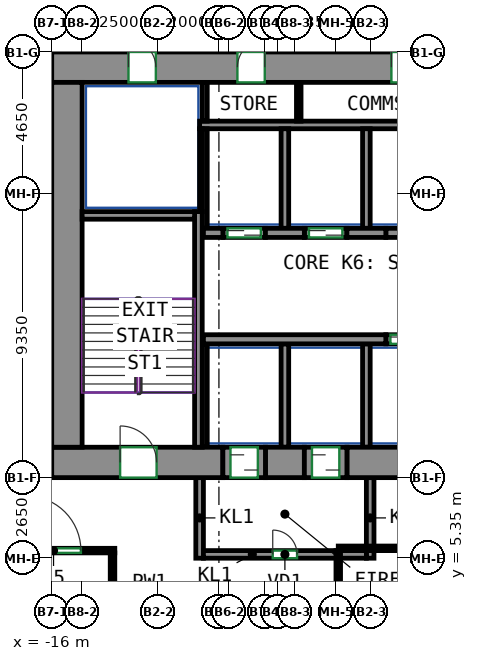
"""IFC4 building model, lengths in metres.
Left out: names, types, materials, properties, quantities, classifications, styles, units other than length and angle.
Written with IfcOpenShell. Run it as: python <this file> out.ifc"""

import sys

from ifc_helpers import new_model, si_unit, direction, frame, frame_2d, origin, place, context, subcontext, project, spatial, rectangle, extrude, source, transform, mapped, element, fill, save


model = new_model("IFC4")
c1 = context("Model", 3, precision=1e-05, world=origin(), true_north=direction((0.0, 1.0)))
c2 = subcontext(c1, "Body", "Model", "MODEL_VIEW")
j1 = project(units=[si_unit("LENGTHUNIT", "METRE"), si_unit("PLANEANGLEUNIT", "RADIAN")], contexts=[c1])
p1 = place(None, origin())
s1 = spatial("IfcSite", under=j1, at=p1, CompositionType="ELEMENT")
p2 = place(p1, origin())
s2 = spatial("IfcBuilding", under=s1, at=p2, CompositionType="ELEMENT")
p3 = place(p2, frame((0.0, 0.0, 27.0)))
s3 = spatial("IfcBuildingStorey", under=s2, at=p3, CompositionType="ELEMENT", Elevation=27.0)
m1 = source(origin(), c2, "Body", "SweptSolid", [
    extrude(rectangle(XDim=5.63, YDim=1.0, at=frame_2d((2.815, 0.0))), origin(), (0.0, 0.0, 1.0), 3.72),
])
p4 = place(p3, frame((-16.0, 8.5, 0.0), z_axis=(0.0, 0.0, 1.0), x_axis=(1.0, 0.0, 0.0)))
e1 = element("IfcWall", 1, at=p4, inside=s3, PredefinedType="SHEAR", context=c2, shape_type="MappedRepresentation", body=[
    mapped(m1, transform((0.0, 0.0, 0.0))),
])
p5 = place(p4, frame((2.25, 0.0, 0.0)))
e2 = element("IfcOpeningElement", 2, at=p5, cuts=e1, PredefinedType="OPENING", context=c2, shape_type="SweptSolid", body=[
    extrude(rectangle(XDim=1.2, YDim=2.1, at=frame_2d((0.6, 1.05))), frame((0.0, 0.51, 0.0), z_axis=(0.0, -1.0, 0.0), x_axis=(1.0, 0.0, 0.0)), (0.0, 0.0, 1.0), 1.02),
])
m2 = source(origin(), c2, "Body", "SweptSolid", [
    extrude(rectangle(XDim=1.28, YDim=1.0, at=frame_2d((0.64, 0.0))), origin(), (0.0, 0.0, 1.0), 3.72),
])
p6 = place(p3, frame((-8.97, 8.5, 0.0), z_axis=(0.0, 0.0, 1.0), x_axis=(1.0, 0.0, 0.0)))
e3 = element("IfcWall", 3, at=p6, inside=s3, PredefinedType="SHEAR", context=c2, shape_type="MappedRepresentation", body=[
    mapped(m2, transform((0.0, 0.0, 0.0))),
])
m3 = source(origin(), c2, "Body", "SweptSolid", [
    extrude(rectangle(XDim=14.18, YDim=1.0, at=frame_2d((7.09, 0.0))), origin(), (0.0, 0.0, 1.0), 3.72),
])
p7 = place(p3, frame((-6.29, 8.5, 0.0), z_axis=(0.0, 0.0, 1.0), x_axis=(1.0, 0.0, 0.0)))
e4 = element("IfcWall", 4, at=p7, inside=s3, PredefinedType="SHEAR", context=c2, shape_type="MappedRepresentation", body=[
    mapped(m3, transform((0.0, 0.0, 0.0))),
])
m4 = source(origin(), c2, "Body", "SweptSolid", [
    extrude(rectangle(XDim=34.1, YDim=1.0, at=frame_2d((17.05, 0.0))), origin(), (0.0, 0.0, 1.0), 3.72),
])
p8 = place(p3, frame((-16.0, 21.5, 0.0), z_axis=(0.0, 0.0, 1.0), x_axis=(1.0, 0.0, 0.0)))
e5 = element("IfcWall", 5, at=p8, inside=s3, PredefinedType="SHEAR", context=c2, shape_type="MappedRepresentation", body=[
    mapped(m4, transform((0.0, 0.0, 0.0))),
])
p9 = place(p8, frame((6.108, 0.0, 0.0)))
e6 = element("IfcOpeningElement", 6, at=p9, cuts=e5, PredefinedType="OPENING", context=c2, shape_type="SweptSolid", body=[
    extrude(rectangle(XDim=0.9, YDim=2.1, at=frame_2d((0.45, 1.05))), frame((0.0, 0.51, 0.0), z_axis=(0.0, -1.0, 0.0), x_axis=(1.0, 0.0, 0.0)), (0.0, 0.0, 1.0), 1.02),
])
p10 = place(p8, frame((11.173, 0.0, 0.0)))
e7 = element("IfcOpeningElement", 7, at=p10, cuts=e5, PredefinedType="OPENING", context=c2, shape_type="SweptSolid", body=[
    extrude(rectangle(XDim=0.9, YDim=2.1, at=frame_2d((0.45, 1.05))), frame((0.0, 0.51, 0.0), z_axis=(0.0, -1.0, 0.0), x_axis=(1.0, 0.0, 0.0)), (0.0, 0.0, 1.0), 1.02),
])
p11 = place(p8, frame((16.238, 0.0, 0.0)))
e8 = element("IfcOpeningElement", 8, at=p11, cuts=e5, PredefinedType="OPENING", context=c2, shape_type="SweptSolid", body=[
    extrude(rectangle(XDim=0.9, YDim=2.1, at=frame_2d((0.45, 1.05))), frame((0.0, 0.51, 0.0), z_axis=(0.0, -1.0, 0.0), x_axis=(1.0, 0.0, 0.0)), (0.0, 0.0, 1.0), 1.02),
])
p12 = place(p8, frame((21.062, 0.0, 0.0)))
e9 = element("IfcOpeningElement", 9, at=p12, cuts=e5, PredefinedType="OPENING", context=c2, shape_type="SweptSolid", body=[
    extrude(rectangle(XDim=0.9, YDim=2.1, at=frame_2d((0.45, 1.05))), frame((0.0, 0.51, 0.0), z_axis=(0.0, -1.0, 0.0), x_axis=(1.0, 0.0, 0.0)), (0.0, 0.0, 1.0), 1.02),
])
p13 = place(p8, frame((26.489, 0.0, 0.0)))
e10 = element("IfcOpeningElement", 10, at=p13, cuts=e5, PredefinedType="OPENING", context=c2, shape_type="SweptSolid", body=[
    extrude(rectangle(XDim=0.9, YDim=2.1, at=frame_2d((0.45, 1.05))), frame((0.0, 0.51, 0.0), z_axis=(0.0, -1.0, 0.0), x_axis=(1.0, 0.0, 0.0)), (0.0, 0.0, 1.0), 1.02),
])
p14 = place(p8, frame((2.525, 0.0, 0.0)))
e11 = element("IfcOpeningElement", 11, at=p14, cuts=e5, PredefinedType="OPENING", context=c2, shape_type="SweptSolid", body=[
    extrude(rectangle(XDim=0.9, YDim=2.1, at=frame_2d((0.45, 1.05))), frame((0.0, 0.51, 0.0), z_axis=(0.0, -1.0, 0.0), x_axis=(1.0, 0.0, 0.0)), (0.0, 0.0, 1.0), 1.02),
])
p15 = place(p8, frame((30.675, 0.0, 0.0)))
e12 = element("IfcOpeningElement", 12, at=p15, cuts=e5, PredefinedType="OPENING", context=c2, shape_type="SweptSolid", body=[
    extrude(rectangle(XDim=0.9, YDim=2.1, at=frame_2d((0.45, 1.05))), frame((0.0, 0.51, 0.0), z_axis=(0.0, -1.0, 0.0), x_axis=(1.0, 0.0, 0.0)), (0.0, 0.0, 1.0), 1.02),
])
m5 = source(origin(), c2, "Body", "SweptSolid", [
    extrude(rectangle(XDim=12.0, YDim=1.0, at=frame_2d((6.0, 0.0))), origin(), (0.0, 0.0, 1.0), 3.72),
])
p16 = place(p3, frame((-15.5, 9.0, 0.0), z_axis=(0.0, 0.0, 1.0), x_axis=(0.0, 1.0, 0.0)))
e13 = element("IfcWall", 13, at=p16, inside=s3, PredefinedType="SHEAR", context=c2, shape_type="MappedRepresentation", body=[
    mapped(m5, transform((0.0, 0.0, 0.0))),
])
m6 = source(origin(), c2, "Body", "SweptSolid", [
    extrude(rectangle(XDim=7.75, YDim=0.25, at=frame_2d((3.875, 0.0))), origin(), (0.0, 0.0, 1.0), 3.72),
])
p17 = place(p3, frame((-11.175, 9.0, 0.0), z_axis=(0.0, 0.0, 1.0), x_axis=(0.0, 1.0, 0.0)))
e14 = element("IfcWall", 14, at=p17, inside=s3, PredefinedType="SHEAR", context=c2, shape_type="MappedRepresentation", body=[
    mapped(m6, transform((0.0, 0.0, 0.0))),
])
m7 = source(origin(), c2, "Body", "SweptSolid", [
    extrude(rectangle(XDim=3.7, YDim=0.25, at=frame_2d((1.85, 0.0))), origin(), (0.0, 0.0, 1.0), 3.72),
])
p18 = place(p3, frame((-15.0, 16.625, 0.0), z_axis=(0.0, 0.0, 1.0), x_axis=(1.0, 0.0, 0.0)))
e15 = element("IfcWall", 15, at=p18, inside=s3, PredefinedType="SHEAR", context=c2, shape_type="MappedRepresentation", body=[
    mapped(m7, transform((0.0, 0.0, 0.0))),
])
m8 = source(origin(), c2, "Body", "SweptSolid", [
    extrude(rectangle(XDim=6.0, YDim=0.3, at=frame_2d((3.0, 0.0))), origin(), (0.0, 0.0, 1.0), 3.72),
])
p19 = place(p3, frame((-11.01, 12.55, 0.0), z_axis=(0.0, 0.0, 1.0), x_axis=(1.0, 0.0, 0.0)))
e16 = element("IfcWall", 16, at=p19, inside=s3, PredefinedType="SHEAR", context=c2, shape_type="MappedRepresentation", body=[
    mapped(m8, transform((0.0, 0.0, 0.0))),
])
m9 = source(origin(), c2, "Body", "SweptSolid", [
    extrude(rectangle(XDim=0.64, YDim=0.3, at=frame_2d((0.32, 0.0))), origin(), (0.0, 0.0, 1.0), 3.72),
])
p20 = place(p3, frame((-11.01, 16.05, 0.0), z_axis=(0.0, 0.0, 1.0), x_axis=(1.0, 0.0, 0.0)))
e17 = element("IfcWall", 17, at=p20, inside=s3, PredefinedType="SHEAR", context=c2, shape_type="MappedRepresentation", body=[
    mapped(m9, transform((0.0, 0.0, 0.0))),
])
m10 = source(origin(), c2, "Body", "SweptSolid", [
    extrude(rectangle(XDim=1.28, YDim=0.3, at=frame_2d((0.64, 0.0))), origin(), (0.0, 0.0, 1.0), 3.72),
])
for number, where, z_axis, x_axis in (
    (18, (-8.97, 16.05, 0.0), (0.0, 0.0, 1.0), (1.0, 0.0, 0.0)),
    (19, (-6.29, 16.05, 0.0), (0.0, 0.0, 1.0), (1.0, 0.0, 0.0)),
):
    element("IfcWall", number, at=place(p3, frame(where, z_axis=z_axis, x_axis=x_axis)), inside=s3, PredefinedType="SHEAR", context=c2, shape_type="MappedRepresentation", body=[
        mapped(m10, transform((0.0, 0.0, 0.0))),
    ])
m11 = source(origin(), c2, "Body", "SweptSolid", [
    extrude(rectangle(XDim=1.4, YDim=0.3, at=frame_2d((0.7, 0.0))), origin(), (0.0, 0.0, 1.0), 3.72),
])
p21 = place(p3, frame((-5.01, 12.55, 0.0), z_axis=(0.0, 0.0, 1.0), x_axis=(1.0, 0.0, 0.0)))
e20 = element("IfcWall", 20, at=p21, inside=s3, PredefinedType="PARTITIONING", context=c2, shape_type="MappedRepresentation", body=[
    mapped(m11, transform((0.0, 0.0, 0.0))),
])
p22 = place(p21, frame((0.15, 0.0, 0.0)))
e21 = element("IfcOpeningElement", 21, at=p22, cuts=e20, PredefinedType="OPENING", context=c2, shape_type="SweptSolid", body=[
    extrude(rectangle(XDim=1.1, YDim=2.1, at=frame_2d((0.55, 1.05))), frame((0.0, 0.16, 0.0), z_axis=(0.0, -1.0, 0.0), x_axis=(1.0, 0.0, 0.0)), (0.0, 0.0, 1.0), 0.32),
])
m12 = source(origin(), c2, "Body", "SweptSolid", [
    extrude(rectangle(XDim=1.4, YDim=0.3, at=frame_2d((0.7, 0.0))), origin(), (0.0, 0.0, 1.0), 3.72),
])
p23 = place(p3, frame((-10.37, 16.05, 0.0), z_axis=(0.0, 0.0, 1.0), x_axis=(1.0, 0.0, 0.0)))
e22 = element("IfcWall", 22, at=p23, inside=s3, PredefinedType="PARTITIONING", context=c2, shape_type="MappedRepresentation", body=[
    mapped(m12, transform((0.0, 0.0, 0.0))),
])
p24 = place(p23, frame((0.15, 0.0, 0.0)))
e23 = element("IfcOpeningElement", 23, at=p24, cuts=e22, PredefinedType="OPENING", context=c2, shape_type="SweptSolid", body=[
    extrude(rectangle(XDim=1.1, YDim=2.1, at=frame_2d((0.55, 1.05))), frame((0.0, 0.16, 0.0), z_axis=(0.0, -1.0, 0.0), x_axis=(1.0, 0.0, 0.0)), (0.0, 0.0, 1.0), 0.32),
])
p25 = place(p3, frame((-7.69, 16.05, 0.0), z_axis=(0.0, 0.0, 1.0), x_axis=(1.0, 0.0, 0.0)))
e24 = element("IfcWall", 24, at=p25, inside=s3, PredefinedType="PARTITIONING", context=c2, shape_type="MappedRepresentation", body=[
    mapped(m11, transform((0.0, 0.0, 0.0))),
])
p26 = place(p25, frame((0.15, 0.0, 0.0)))
e25 = element("IfcOpeningElement", 25, at=p26, cuts=e24, PredefinedType="OPENING", context=c2, shape_type="SweptSolid", body=[
    extrude(rectangle(XDim=1.1, YDim=2.1, at=frame_2d((0.55, 1.05))), frame((0.0, 0.16, 0.0), z_axis=(0.0, -1.0, 0.0), x_axis=(1.0, 0.0, 0.0)), (0.0, 0.0, 1.0), 0.32),
])
p27 = place(p3, frame((-5.01, 16.05, 0.0), z_axis=(0.0, 0.0, 1.0), x_axis=(1.0, 0.0, 0.0)))
e26 = element("IfcWall", 26, at=p27, inside=s3, PredefinedType="PARTITIONING", context=c2, shape_type="MappedRepresentation", body=[
    mapped(m11, transform((0.0, 0.0, 0.0))),
])
m13 = source(origin(), c2, "Body", "SweptSolid", [
    extrude(rectangle(XDim=2.65, YDim=0.25, at=frame_2d((1.325, 0.0))), origin(), (0.0, 0.0, 1.0), 3.72),
])
for number, where, z_axis, x_axis in (
    (27, (-11.135, 5.35, 0.0), (0.0, 0.0, 1.0), (0.0, 1.0, 0.0)),
    (28, (-5.525, 5.35, 0.0), (0.0, 0.0, 1.0), (0.0, 1.0, 0.0)),
):
    element("IfcWall", number, at=place(p3, frame(where, z_axis=z_axis, x_axis=x_axis)), inside=s3, PredefinedType="PARTITIONING", context=c2, shape_type="MappedRepresentation", body=[
        mapped(m13, transform((0.0, 0.0, 0.0))),
    ])
m14 = source(origin(), c2, "Body", "SweptSolid", [
    extrude(rectangle(XDim=5.36, YDim=0.25, at=frame_2d((2.68, 0.0))), origin(), (0.0, 0.0, 1.0), 3.72),
])
p28 = place(p3, frame((-11.01, 5.475, 0.0), z_axis=(0.0, 0.0, 1.0), x_axis=(1.0, 0.0, 0.0)))
e29 = element("IfcWall", 29, at=p28, inside=s3, PredefinedType="PARTITIONING", context=c2, shape_type="MappedRepresentation", body=[
    mapped(m14, transform((0.0, 0.0, 0.0))),
])
p29 = place(p28, frame((2.28, 0.0, 0.0)))
e30 = element("IfcOpeningElement", 30, at=p29, cuts=e29, PredefinedType="OPENING", context=c2, shape_type="SweptSolid", body=[
    extrude(rectangle(XDim=0.8, YDim=2.0, at=frame_2d((0.4, 1.0))), frame((0.0, 0.135, 0.0), z_axis=(0.0, -1.0, 0.0), x_axis=(1.0, 0.0, 0.0)), (0.0, 0.0, 1.0), 0.27),
])
m15 = source(origin(), c2, "Body", "SweptSolid", [
    extrude(rectangle(XDim=24.37, YDim=0.25, at=frame_2d((12.185, 0.0))), origin(), (0.0, 0.0, 1.0), 3.72),
])
p30 = place(p3, frame((-11.135, 19.6, 0.0), z_axis=(0.0, 0.0, 1.0), x_axis=(1.0, 0.0, 0.0)))
e31 = element("IfcWall", 31, at=p30, inside=s3, PredefinedType="PARTITIONING", context=c2, shape_type="MappedRepresentation", body=[
    mapped(m15, transform((0.0, 0.0, 0.0))),
])
m16 = source(origin(), c2, "Body", "SweptSolid", [
    extrude(rectangle(XDim=3.275, YDim=0.165, at=frame_2d((1.638, 0.0))), origin(), (0.0, 0.0, 1.0), 3.72),
])
p31 = place(p3, frame((-10.968, 16.2, 0.0), z_axis=(0.0, 0.0, 1.0), x_axis=(0.0, 1.0, 0.0)))
e32 = element("IfcWall", 32, at=p31, inside=s3, PredefinedType="PARTITIONING", context=c2, shape_type="MappedRepresentation", body=[
    mapped(m16, transform((0.0, 0.0, 0.0))),
])
m17 = source(origin(), c2, "Body", "SweptSolid", [
    extrude(rectangle(XDim=1.275, YDim=0.165, at=frame_2d((0.637, 0.0))), origin(), (0.0, 0.0, 1.0), 3.72),
])
p32 = place(p3, frame((-10.968, 19.725, 0.0), z_axis=(0.0, 0.0, 1.0), x_axis=(0.0, 1.0, 0.0)))
e33 = element("IfcWall", 33, at=p32, inside=s3, PredefinedType="PARTITIONING", context=c2, shape_type="MappedRepresentation", body=[
    mapped(m17, transform((0.0, 0.0, 0.0))),
])
m18 = source(origin(), c2, "Body", "SweptSolid", [
    extrude(rectangle(XDim=2.725, YDim=0.085, at=frame_2d((1.363, 0.0))), origin(), (0.0, 0.0, 1.0), 3.72),
])
p33 = place(p3, frame((-11.093, 16.75, 0.0), z_axis=(0.0, 0.0, 1.0), x_axis=(0.0, 1.0, 0.0)))
e34 = element("IfcWall", 34, at=p33, inside=s3, PredefinedType="PARTITIONING", context=c2, shape_type="MappedRepresentation", body=[
    mapped(m18, transform((0.0, 0.0, 0.0))),
])
m19 = source(origin(), c2, "Body", "SweptSolid", [
    extrude(rectangle(XDim=3.275, YDim=0.25, at=frame_2d((1.638, 0.0))), origin(), (0.0, 0.0, 1.0), 3.72),
])
for number, where, z_axis, x_axis in (
    (35, (-5.65, 16.2, 0.0), (0.0, 0.0, 1.0), (0.0, 1.0, 0.0)),
    (36, (-8.33, 16.2, 0.0), (0.0, 0.0, 1.0), (0.0, 1.0, 0.0)),
):
    element("IfcWall", number, at=place(p3, frame(where, z_axis=z_axis, x_axis=x_axis)), inside=s3, PredefinedType="PARTITIONING", context=c2, shape_type="MappedRepresentation", body=[
        mapped(m19, transform((0.0, 0.0, 0.0))),
    ])
m20 = source(origin(), c2, "Body", "SweptSolid", [
    extrude(rectangle(XDim=3.4, YDim=0.165, at=frame_2d((1.7, 0.0))), origin(), (0.0, 0.0, 1.0), 3.72),
])
p34 = place(p3, frame((-10.968, 9.0, 0.0), z_axis=(0.0, 0.0, 1.0), x_axis=(0.0, 1.0, 0.0)))
e37 = element("IfcWall", 37, at=p34, inside=s3, PredefinedType="PARTITIONING", context=c2, shape_type="MappedRepresentation", body=[
    mapped(m20, transform((0.0, 0.0, 0.0))),
])
m21 = source(origin(), c2, "Body", "SweptSolid", [
    extrude(rectangle(XDim=3.4, YDim=0.25, at=frame_2d((1.7, 0.0))), origin(), (0.0, 0.0, 1.0), 3.72),
])
for number, where, z_axis, x_axis in (
    (38, (-5.65, 9.0, 0.0), (0.0, 0.0, 1.0), (0.0, 1.0, 0.0)),
    (39, (-8.33, 9.0, 0.0), (0.0, 0.0, 1.0), (0.0, 1.0, 0.0)),
):
    element("IfcWall", number, at=place(p3, frame(where, z_axis=z_axis, x_axis=x_axis)), inside=s3, PredefinedType="PARTITIONING", context=c2, shape_type="MappedRepresentation", body=[
        mapped(m21, transform((0.0, 0.0, 0.0))),
    ])
m22 = source(origin(), c2, "Body", "SweptSolid", [
    extrude(rectangle(XDim=1.275, YDim=0.15, at=frame_2d((0.637, 0.0))), origin(), (0.0, 0.0, 1.0), 3.72),
])
p35 = place(p3, frame((-7.875, 19.725, 0.0), z_axis=(0.0, 0.0, 1.0), x_axis=(0.0, 1.0, 0.0)))
e40 = element("IfcWall", 40, at=p35, inside=s3, PredefinedType="PARTITIONING", context=c2, shape_type="MappedRepresentation", body=[
    mapped(m22, transform((0.0, 0.0, 0.0))),
])
m23 = source(origin(), c2, "Body", "SweptSolid", [
    extrude(rectangle(XDim=1.4, YDim=1.0, at=frame_2d((0.7, 0.0))), origin(), (0.0, 0.0, 1.0), 2.7),
])
p36 = place(p3, frame((-10.37, 8.5, 0.0), z_axis=(0.0, 0.0, 1.0), x_axis=(1.0, 0.0, 0.0)))
e41 = element("IfcWall", 41, at=p36, inside=s3, PredefinedType="PARTITIONING", context=c2, shape_type="MappedRepresentation", body=[
    mapped(m23, transform((0.0, 0.0, 0.0))),
])
p37 = place(p36, frame((0.25, 0.0, 0.0)))
e42 = element("IfcOpeningElement", 42, at=p37, cuts=e41, PredefinedType="OPENING", context=c2, shape_type="SweptSolid", body=[
    extrude(rectangle(XDim=0.9, YDim=2.1, at=frame_2d((0.45, 1.05))), frame((0.0, 0.51, 0.0), z_axis=(0.0, -1.0, 0.0), x_axis=(1.0, 0.0, 0.0)), (0.0, 0.0, 1.0), 1.02),
])
m24 = source(origin(), c2, "Body", "SweptSolid", [
    extrude(rectangle(XDim=1.4, YDim=1.0, at=frame_2d((0.7, 0.0))), origin(), (0.0, 0.0, 1.0), 2.7),
])
p38 = place(p3, frame((-7.69, 8.5, 0.0), z_axis=(0.0, 0.0, 1.0), x_axis=(1.0, 0.0, 0.0)))
e43 = element("IfcWall", 43, at=p38, inside=s3, PredefinedType="PARTITIONING", context=c2, shape_type="MappedRepresentation", body=[
    mapped(m24, transform((0.0, 0.0, 0.0))),
])
p39 = place(p38, frame((0.25, 0.0, 0.0)))
e44 = element("IfcOpeningElement", 44, at=p39, cuts=e43, PredefinedType="OPENING", context=c2, shape_type="SweptSolid", body=[
    extrude(rectangle(XDim=0.9, YDim=2.1, at=frame_2d((0.45, 1.05))), frame((0.0, 0.51, 0.0), z_axis=(0.0, -1.0, 0.0), x_axis=(1.0, 0.0, 0.0)), (0.0, 0.0, 1.0), 1.02),
])
p40 = place(p3, frame((-14.0, 5.525, 0.0), z_axis=(0.0, 0.0, 1.0), x_axis=(0.0, -1.0, 0.0)))
e45 = element("IfcWall", 45, at=p40, inside=s3, PredefinedType="PARTITIONING", context=c2, shape_type="SweptSolid", body=[
    extrude(rectangle(XDim=1.95, YDim=0.15, at=frame_2d((0.975, 0.0))), origin(), (0.0, 0.0, 1.0), 3.72),
])
p41 = place(p3, frame((-19.275, 5.6, 0.0), z_axis=(0.0, 0.0, 1.0), x_axis=(1.0, 0.0, 0.0)))
e46 = element("IfcWall", 46, at=p41, inside=s3, PredefinedType="PARTITIONING", context=c2, shape_type="SweptSolid", body=[
    extrude(rectangle(XDim=5.35, YDim=0.15, at=frame_2d((2.675, 0.0))), origin(), (0.0, 0.0, 1.0), 3.72),
])
p42 = place(p41, frame((2.435, 0.0, 0.0)))
e47 = element("IfcOpeningElement", 47, at=p42, cuts=e46, PredefinedType="OPENING", context=c2, shape_type="SweptSolid", body=[
    extrude(rectangle(XDim=1.8, YDim=2.1, at=frame_2d((0.9, 1.05))), frame((0.0, 0.085, 0.0), z_axis=(0.0, -1.0, 0.0), x_axis=(1.0, 0.0, 0.0)), (0.0, 0.0, 1.0), 0.17),
])
p43 = place(p3, frame((-6.575, -9.4, 0.0), z_axis=(0.0, 0.0, 1.0), x_axis=(0.0, 1.0, 0.0)))
e48 = element("IfcWall", 48, at=p43, inside=s3, PredefinedType="PARTITIONING", context=c2, shape_type="SweptSolid", body=[
    extrude(rectangle(XDim=15.0, YDim=0.15, at=frame_2d((7.5, 0.0))), origin(), (0.0, 0.0, 1.0), 3.72),
])
p44 = place(p3, frame((-6.575, 5.675, 0.0), z_axis=(0.0, 0.0, 1.0), x_axis=(1.0, 0.0, 0.0)))
e49 = element("IfcWall", 49, at=p44, inside=s3, PredefinedType="PARTITIONING", context=c2, shape_type="SweptSolid", body=[
    extrude(rectangle(XDim=15.075, YDim=0.15, at=frame_2d((7.538, 0.0))), origin(), (0.0, 0.0, 1.0), 3.72),
])
p45 = place(p29, origin())
e50 = element("IfcDoor", 50, at=p45, inside=s3, OperationType="SINGLE_SWING_LEFT", PredefinedType="DOOR", context=c2, shape_type="SweptSolid", body=[
    extrude(rectangle(XDim=0.8, YDim=2.0, at=frame_2d((0.4, 1.0))), frame((0.0, 0.025, 0.0), z_axis=(0.0, -1.0, 0.0), x_axis=(1.0, 0.0, 0.0)), (0.0, 0.0, 1.0), 0.05),
])
fill(e30, e50)
p46 = place(p37, origin())
e51 = element("IfcDoor", 51, at=p46, inside=s3, OperationType="SLIDING_TO_LEFT", PredefinedType="DOOR", context=c2, shape_type="SweptSolid", body=[
    extrude(rectangle(XDim=0.9, YDim=2.1, at=frame_2d((0.45, 1.05))), frame((0.0, 0.405, 0.0), z_axis=(0.0, -1.0, 0.0), x_axis=(1.0, 0.0, 0.0)), (0.0, 0.0, 1.0), 0.05),
])
fill(e42, e51)
p47 = place(p39, origin())
e52 = element("IfcDoor", 52, at=p47, inside=s3, OperationType="SLIDING_TO_RIGHT", PredefinedType="DOOR", context=c2, shape_type="SweptSolid", body=[
    extrude(rectangle(XDim=0.9, YDim=2.1, at=frame_2d((0.45, 1.05))), frame((0.0, 0.405, 0.0), z_axis=(0.0, -1.0, 0.0), x_axis=(1.0, 0.0, 0.0)), (0.0, 0.0, 1.0), 0.05),
])
fill(e44, e52)
p48 = place(p22, origin())
e53 = element("IfcDoor", 53, at=p48, inside=s3, OperationType="DOUBLE_DOOR_SLIDING", PredefinedType="DOOR", context=c2, shape_type="SweptSolid", body=[
    extrude(rectangle(XDim=1.1, YDim=2.1, at=frame_2d((0.55, 1.05))), frame((0.0, 0.025, 0.0), z_axis=(0.0, -1.0, 0.0), x_axis=(1.0, 0.0, 0.0)), (0.0, 0.0, 1.0), 0.05),
])
fill(e21, e53)
p49 = place(p24, origin())
e54 = element("IfcDoor", 54, at=p49, inside=s3, OperationType="DOUBLE_DOOR_SLIDING", PredefinedType="DOOR", context=c2, shape_type="SweptSolid", body=[
    extrude(rectangle(XDim=1.1, YDim=2.1, at=frame_2d((0.55, 1.05))), frame((0.0, 0.025, 0.0), z_axis=(0.0, -1.0, 0.0), x_axis=(1.0, 0.0, 0.0)), (0.0, 0.0, 1.0), 0.05),
])
fill(e23, e54)
p50 = place(p26, origin())
e55 = element("IfcDoor", 55, at=p50, inside=s3, OperationType="DOUBLE_DOOR_SLIDING", PredefinedType="DOOR", context=c2, shape_type="SweptSolid", body=[
    extrude(rectangle(XDim=1.1, YDim=2.1, at=frame_2d((0.55, 1.05))), frame((0.0, 0.025, 0.0), z_axis=(0.0, -1.0, 0.0), x_axis=(1.0, 0.0, 0.0)), (0.0, 0.0, 1.0), 0.05),
])
fill(e25, e55)
p51 = place(p9, origin())
e56 = element("IfcDoor", 56, at=p51, inside=s3, OperationType="SINGLE_SWING_RIGHT", PredefinedType="DOOR", context=c2, shape_type="SweptSolid", body=[
    extrude(rectangle(XDim=0.9, YDim=2.1, at=frame_2d((0.45, 1.05))), frame((0.0, -0.355, 0.0), z_axis=(0.0, -1.0, 0.0), x_axis=(1.0, 0.0, 0.0)), (0.0, 0.0, 1.0), 0.05),
])
fill(e6, e56)
p52 = place(p10, origin())
e57 = element("IfcDoor", 57, at=p52, inside=s3, OperationType="SINGLE_SWING_LEFT", PredefinedType="DOOR", context=c2, shape_type="SweptSolid", body=[
    extrude(rectangle(XDim=0.9, YDim=2.1, at=frame_2d((0.45, 1.05))), frame((0.0, -0.355, 0.0), z_axis=(0.0, -1.0, 0.0), x_axis=(1.0, 0.0, 0.0)), (0.0, 0.0, 1.0), 0.05),
])
fill(e7, e57)
p53 = place(p14, origin())
e58 = element("IfcDoor", 58, at=p53, inside=s3, OperationType="SINGLE_SWING_LEFT", PredefinedType="DOOR", context=c2, shape_type="SweptSolid", body=[
    extrude(rectangle(XDim=0.9, YDim=2.1, at=frame_2d((0.45, 1.05))), frame((0.0, -0.355, 0.0), z_axis=(0.0, -1.0, 0.0), x_axis=(1.0, 0.0, 0.0)), (0.0, 0.0, 1.0), 0.05),
])
fill(e11, e58)
p54 = place(p5, origin())
e59 = element("IfcDoor", 59, at=p54, inside=s3, OperationType="DOUBLE_DOOR_SINGLE_SWING", PredefinedType="DOOR", context=c2, shape_type="SweptSolid", body=[
    extrude(rectangle(XDim=1.2, YDim=2.1, at=frame_2d((0.6, 1.05))), frame((0.0, 0.405, 0.0), z_axis=(0.0, -1.0, 0.0), x_axis=(1.0, 0.0, 0.0)), (0.0, 0.0, 1.0), 0.05),
])
fill(e2, e59)
p55 = place(p42, origin())
e60 = element("IfcDoor", 60, at=p55, inside=s3, OperationType="DOUBLE_DOOR_SINGLE_SWING", PredefinedType="DOOR", context=c2, shape_type="SweptSolid", body=[
    extrude(rectangle(XDim=1.8, YDim=2.1, at=frame_2d((0.9, 1.05))), frame((0.0, 0.025, 0.0), z_axis=(0.0, -1.0, 0.0), x_axis=(1.0, 0.0, 0.0)), (0.0, 0.0, 1.0), 0.05),
])
fill(e47, e60)
save(model, sys.argv[1])
